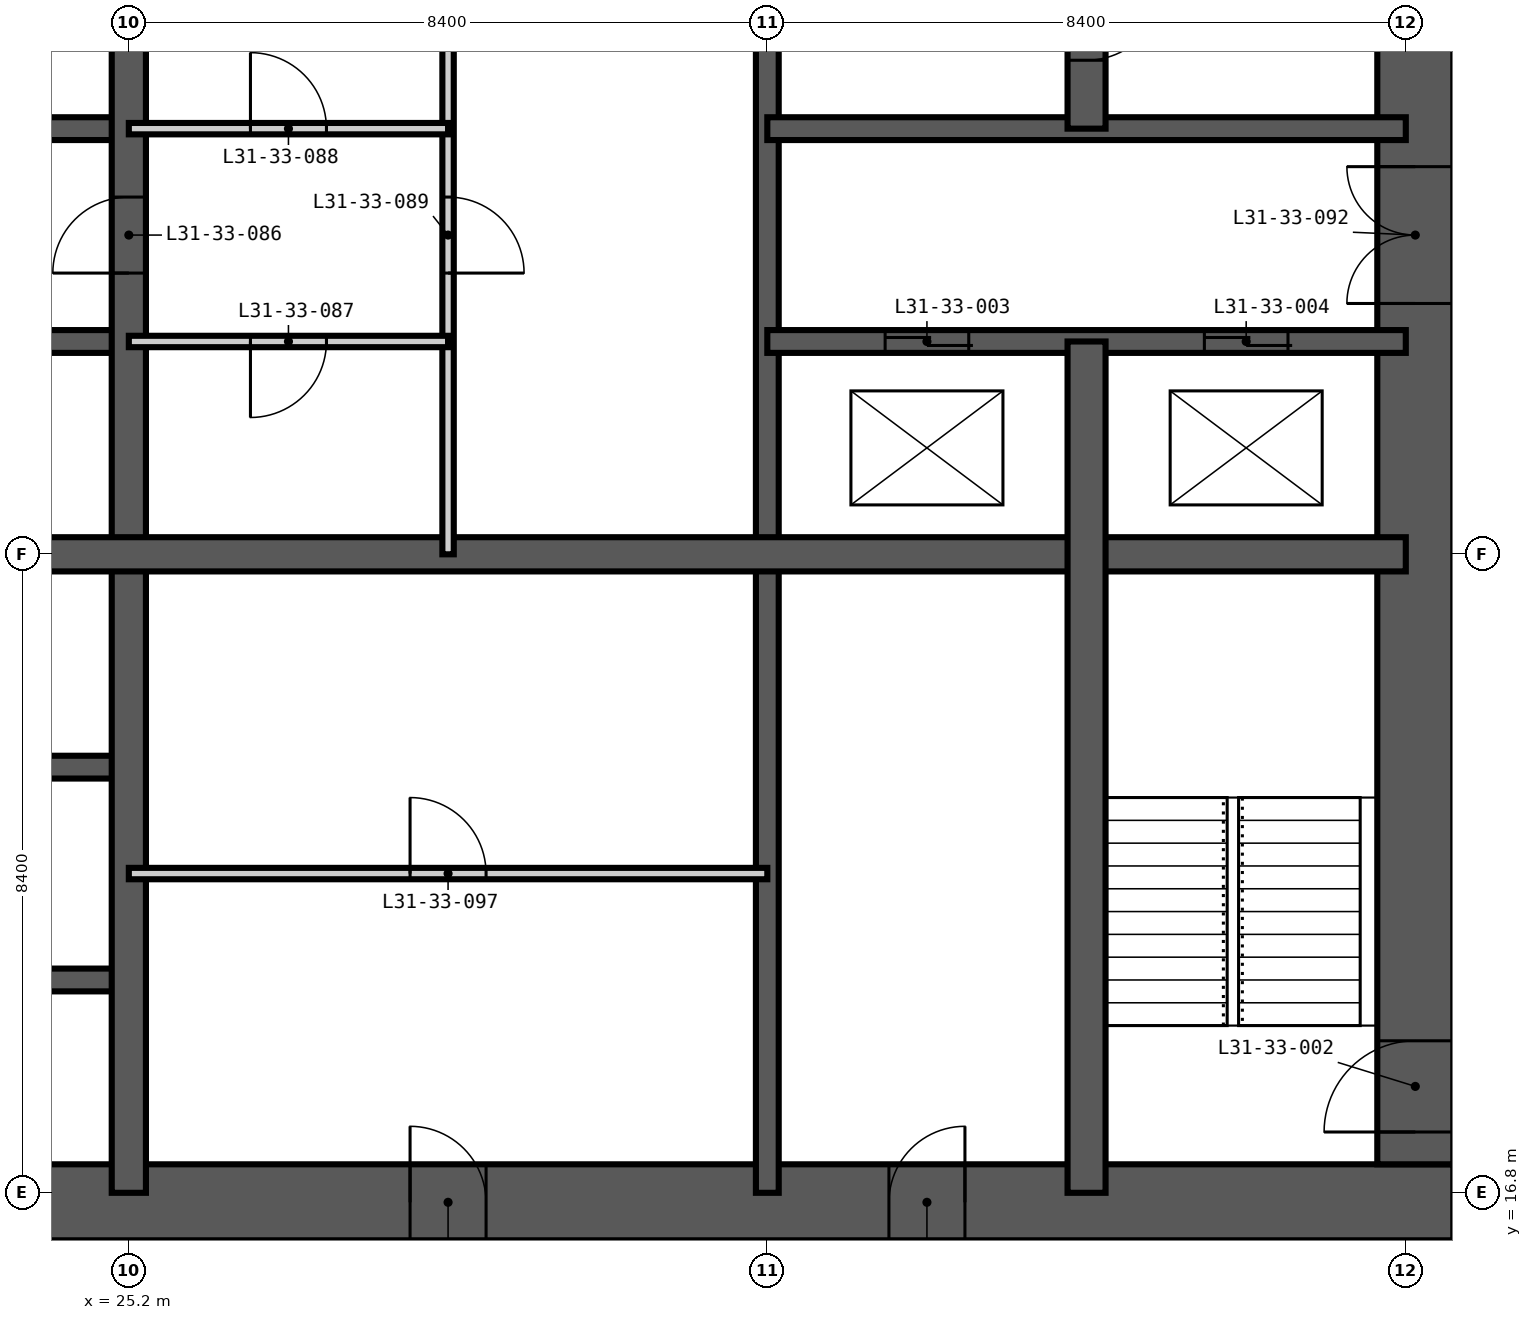
"""IFC4 building model, lengths in metres.
Left out: names, types, materials, properties, quantities, classifications, styles, units other than length and angle.
Written with IfcOpenShell. Run it as: python <this file> out.ifc"""

import sys

from ifc_helpers import new_model, si_unit, direction, frame, frame_2d, origin, place, context, subcontext, project, spatial, rectangle, extrude, element, fill, save


model = new_model("IFC4")
c1 = context("Model", 3, precision=1e-05, world=origin(), true_north=direction((0.0, 1.0)))
c2 = subcontext(c1, "Body", "Model", "MODEL_VIEW")
j1 = project(units=[si_unit("LENGTHUNIT", "METRE"), si_unit("PLANEANGLEUNIT", "RADIAN")], contexts=[c1])
p1 = place(None, origin())
s1 = spatial("IfcSite", under=j1, at=p1, CompositionType="ELEMENT")
p2 = place(p1, origin())
s2 = spatial("IfcBuilding", under=s1, at=p2, CompositionType="ELEMENT")
p3 = place(p2, frame((0.0, 0.0, 122.4)))
s3 = spatial("IfcBuildingStorey", under=s2, at=p3, CompositionType="ELEMENT", Elevation=122.4)
p4 = place(p3, frame((16.175, 16.675, -0.35), z_axis=(0.0, 0.0, 1.0), x_axis=(1.0, 0.0, 0.0)))
e1 = element("IfcWall", 1, at=p4, inside=s3, PredefinedType="SHEAR", context=c2, shape_type="SweptSolid", body=[
    extrude(rectangle(XDim=26.45, YDim=1.0, at=frame_2d((13.225, 0.0))), origin(), (0.0, 0.0, 1.0), 3.6),
])
p5 = place(p4, frame((12.725, 0.0, 0.35)))
e2 = element("IfcOpeningElement", 2, at=p5, cuts=e1, PredefinedType="OPENING", context=c2, shape_type="SweptSolid", body=[
    extrude(rectangle(XDim=1.0, YDim=2.1, at=frame_2d((0.5, 1.05))), frame((0.0, 0.51, 0.0), z_axis=(0.0, -1.0, 0.0), x_axis=(1.0, 0.0, 0.0)), (0.0, 0.0, 1.0), 1.02),
])
p6 = place(p4, frame((19.025, 0.0, 0.35)))
e3 = element("IfcOpeningElement", 3, at=p6, cuts=e1, PredefinedType="OPENING", context=c2, shape_type="SweptSolid", body=[
    extrude(rectangle(XDim=1.0, YDim=2.1, at=frame_2d((0.5, 1.05))), frame((0.0, 0.51, 0.0), z_axis=(0.0, -1.0, 0.0), x_axis=(1.0, 0.0, 0.0)), (0.0, 0.0, 1.0), 1.02),
])
p7 = place(p3, frame((42.125, 17.175, -0.35), z_axis=(0.0, 0.0, 1.0), x_axis=(0.0, 1.0, 0.0)))
e4 = element("IfcWall", 4, at=p7, inside=s3, PredefinedType="SHEAR", context=c2, shape_type="SweptSolid", body=[
    extrude(rectangle(XDim=24.45, YDim=1.0, at=frame_2d((12.225, 0.0))), origin(), (0.0, 0.0, 1.0), 3.6),
])
p8 = place(p7, frame((0.425, 0.0, 0.35)))
e5 = element("IfcOpeningElement", 5, at=p8, cuts=e4, PredefinedType="OPENING", context=c2, shape_type="SweptSolid", body=[
    extrude(rectangle(XDim=1.2, YDim=2.2, at=frame_2d((0.6, 1.1))), frame((0.0, 0.51, 0.0), z_axis=(0.0, -1.0, 0.0), x_axis=(1.0, 0.0, 0.0)), (0.0, 0.0, 1.0), 1.02),
])
p9 = place(p7, frame((11.325, 0.0, 0.35)))
e6 = element("IfcOpeningElement", 6, at=p9, cuts=e4, PredefinedType="OPENING", context=c2, shape_type="SweptSolid", body=[
    extrude(rectangle(XDim=1.8, YDim=2.2, at=frame_2d((0.9, 1.1))), frame((0.0, 0.51, 0.0), z_axis=(0.0, -1.0, 0.0), x_axis=(1.0, 0.0, 0.0)), (0.0, 0.0, 1.0), 1.02),
])
p10 = place(p7, frame((20.125, 0.0, 0.35)))
e7 = element("IfcOpeningElement", 7, at=p10, cuts=e4, PredefinedType="OPENING", context=c2, shape_type="SweptSolid", body=[
    extrude(rectangle(XDim=1.0, YDim=2.1, at=frame_2d((0.5, 1.05))), frame((0.0, 0.51, 0.0), z_axis=(0.0, -1.0, 0.0), x_axis=(1.0, 0.0, 0.0)), (0.0, 0.0, 1.0), 1.02),
])
p11 = place(p3, frame((33.6, 16.8, -0.35), z_axis=(0.0, 0.0, 1.0), x_axis=(0.0, 1.0, 0.0)))
e8 = element("IfcWall", 8, at=p11, inside=s3, PredefinedType="SHEAR", context=c2, shape_type="SweptSolid", body=[
    extrude(rectangle(XDim=25.2, YDim=0.3, at=frame_2d((12.6, 0.0))), origin(), (0.0, 0.0, 1.0), 3.6),
])
p12 = place(p11, frame((22.5, 0.0, 0.35)))
e9 = element("IfcOpeningElement", 9, at=p12, cuts=e8, PredefinedType="OPENING", context=c2, shape_type="SweptSolid", body=[
    extrude(rectangle(XDim=1.2, YDim=2.2, at=frame_2d((0.6, 1.1))), frame((0.0, 0.16, 0.0), z_axis=(0.0, -1.0, 0.0), x_axis=(1.0, 0.0, 0.0)), (0.0, 0.0, 1.0), 0.32),
])
p13 = place(p11, frame((18.3, 0.0, 0.35)))
e10 = element("IfcOpeningElement", 10, at=p13, cuts=e8, PredefinedType="OPENING", context=c2, shape_type="SweptSolid", body=[
    extrude(rectangle(XDim=1.2, YDim=2.2, at=frame_2d((0.6, 1.1))), frame((0.0, 0.16, 0.0), z_axis=(0.0, -1.0, 0.0), x_axis=(1.0, 0.0, 0.0)), (0.0, 0.0, 1.0), 0.32),
])
for number, where, z_axis, x_axis in (
    (11, (16.8, 19.6, -0.35), (0.0, 0.0, 1.0), (1.0, 0.0, 0.0)),
    (12, (16.8, 22.4, -0.35), (0.0, 0.0, 1.0), (1.0, 0.0, 0.0)),
):
    element("IfcWall", number, at=place(p3, frame(where, z_axis=z_axis, x_axis=x_axis)), inside=s3, PredefinedType="SHEAR", context=c2, shape_type="SweptSolid", body=[
        extrude(rectangle(XDim=8.4, YDim=0.3, at=frame_2d((4.2, 0.0))), origin(), (0.0, 0.0, 1.0), 3.6),
    ])
p14 = place(p3, frame((16.8, 28.0, -0.35), z_axis=(0.0, 0.0, 1.0), x_axis=(1.0, 0.0, 0.0)))
e13 = element("IfcWall", 13, at=p14, inside=s3, PredefinedType="SHEAR", context=c2, shape_type="SweptSolid", body=[
    extrude(rectangle(XDim=8.4, YDim=0.3, at=frame_2d((4.2, 0.0))), origin(), (0.0, 0.0, 1.0), 3.6),
])
p15 = place(p14, frame((1.55, 0.0, 0.35)))
e14 = element("IfcOpeningElement", 14, at=p15, cuts=e13, PredefinedType="OPENING", context=c2, shape_type="SweptSolid", body=[
    extrude(rectangle(XDim=1.1, YDim=2.2, at=frame_2d((0.55, 1.1))), frame((0.0, 0.16, 0.0), z_axis=(0.0, -1.0, 0.0), x_axis=(1.0, 0.0, 0.0)), (0.0, 0.0, 1.0), 0.32),
])
p16 = place(p14, frame((5.75, 0.0, 0.35)))
e15 = element("IfcOpeningElement", 15, at=p16, cuts=e13, PredefinedType="OPENING", context=c2, shape_type="SweptSolid", body=[
    extrude(rectangle(XDim=1.1, YDim=2.2, at=frame_2d((0.55, 1.1))), frame((0.0, 0.16, 0.0), z_axis=(0.0, -1.0, 0.0), x_axis=(1.0, 0.0, 0.0)), (0.0, 0.0, 1.0), 0.32),
])
p17 = place(p3, frame((33.6, 28.0, -0.35), z_axis=(0.0, 0.0, 1.0), x_axis=(1.0, 0.0, 0.0)))
e16 = element("IfcWall", 16, at=p17, inside=s3, PredefinedType="SHEAR", context=c2, shape_type="SweptSolid", body=[
    extrude(rectangle(XDim=8.4, YDim=0.3, at=frame_2d((4.2, 0.0))), origin(), (0.0, 0.0, 1.0), 3.6),
])
p18 = place(p17, frame((1.55, 0.0, 0.35)))
e17 = element("IfcOpeningElement", 17, at=p18, cuts=e16, PredefinedType="OPENING", context=c2, shape_type="SweptSolid", body=[
    extrude(rectangle(XDim=1.1, YDim=2.2, at=frame_2d((0.55, 1.1))), frame((0.0, 0.16, 0.0), z_axis=(0.0, -1.0, 0.0), x_axis=(1.0, 0.0, 0.0)), (0.0, 0.0, 1.0), 0.32),
])
p19 = place(p17, frame((5.75, 0.0, 0.35)))
e18 = element("IfcOpeningElement", 18, at=p19, cuts=e16, PredefinedType="OPENING", context=c2, shape_type="SweptSolid", body=[
    extrude(rectangle(XDim=1.1, YDim=2.2, at=frame_2d((0.55, 1.1))), frame((0.0, 0.16, 0.0), z_axis=(0.0, -1.0, 0.0), x_axis=(1.0, 0.0, 0.0)), (0.0, 0.0, 1.0), 0.32),
])
p20 = place(p3, frame((16.8, 30.8, -0.35), z_axis=(0.0, 0.0, 1.0), x_axis=(1.0, 0.0, 0.0)))
e19 = element("IfcWall", 19, at=p20, inside=s3, PredefinedType="SHEAR", context=c2, shape_type="SweptSolid", body=[
    extrude(rectangle(XDim=8.4, YDim=0.3, at=frame_2d((4.2, 0.0))), origin(), (0.0, 0.0, 1.0), 3.6),
])
p21 = place(p20, frame((1.55, 0.0, 0.35)))
e20 = element("IfcOpeningElement", 20, at=p21, cuts=e19, PredefinedType="OPENING", context=c2, shape_type="SweptSolid", body=[
    extrude(rectangle(XDim=1.1, YDim=2.2, at=frame_2d((0.55, 1.1))), frame((0.0, 0.16, 0.0), z_axis=(0.0, -1.0, 0.0), x_axis=(1.0, 0.0, 0.0)), (0.0, 0.0, 1.0), 0.32),
])
p22 = place(p20, frame((5.75, 0.0, 0.35)))
e21 = element("IfcOpeningElement", 21, at=p22, cuts=e19, PredefinedType="OPENING", context=c2, shape_type="SweptSolid", body=[
    extrude(rectangle(XDim=1.1, YDim=2.2, at=frame_2d((0.55, 1.1))), frame((0.0, 0.16, 0.0), z_axis=(0.0, -1.0, 0.0), x_axis=(1.0, 0.0, 0.0)), (0.0, 0.0, 1.0), 0.32),
])
p23 = place(p3, frame((33.6, 30.8, -0.35), z_axis=(0.0, 0.0, 1.0), x_axis=(1.0, 0.0, 0.0)))
e22 = element("IfcWall", 22, at=p23, inside=s3, PredefinedType="SHEAR", context=c2, shape_type="SweptSolid", body=[
    extrude(rectangle(XDim=8.4, YDim=0.3, at=frame_2d((4.2, 0.0))), origin(), (0.0, 0.0, 1.0), 3.6),
])
p24 = place(p3, frame((25.2, 16.8, -0.35), z_axis=(0.0, 0.0, 1.0), x_axis=(0.0, 1.0, 0.0)))
e23 = element("IfcWall", 23, at=p24, inside=s3, PredefinedType="SHEAR", context=c2, shape_type="SweptSolid", body=[
    extrude(rectangle(XDim=25.2, YDim=0.45, at=frame_2d((12.6, 0.0))), origin(), (0.0, 0.0, 1.0), 3.6),
])
p25 = place(p24, frame((12.1, 0.0, 0.35)))
e24 = element("IfcOpeningElement", 24, at=p25, cuts=e23, PredefinedType="OPENING", context=c2, shape_type="SweptSolid", body=[
    extrude(rectangle(XDim=1.0, YDim=2.1, at=frame_2d((0.5, 1.05))), frame((0.0, 0.235, 0.0), z_axis=(0.0, -1.0, 0.0), x_axis=(1.0, 0.0, 0.0)), (0.0, 0.0, 1.0), 0.47),
])
p26 = place(p3, frame((16.8, 25.2, -0.35), z_axis=(0.0, 0.0, 1.0), x_axis=(1.0, 0.0, 0.0)))
e25 = element("IfcWall", 25, at=p26, inside=s3, PredefinedType="SHEAR", context=c2, shape_type="SweptSolid", body=[
    extrude(rectangle(XDim=25.2, YDim=0.45, at=frame_2d((12.6, 0.0))), origin(), (0.0, 0.0, 1.0), 3.6),
])
p27 = place(p3, frame((37.8, 16.8, -0.35), z_axis=(0.0, 0.0, 1.0), x_axis=(0.0, 1.0, 0.0)))
e26 = element("IfcWall", 26, at=p27, inside=s3, PredefinedType="SHEAR", context=c2, shape_type="SweptSolid", body=[
    extrude(rectangle(XDim=11.2, YDim=0.5, at=frame_2d((5.6, 0.0))), origin(), (0.0, 0.0, 1.0), 3.6),
])
p28 = place(p3, frame((37.8, 30.8, -0.35), z_axis=(0.0, 0.0, 1.0), x_axis=(0.0, 1.0, 0.0)))
e27 = element("IfcWall", 27, at=p28, inside=s3, PredefinedType="SHEAR", context=c2, shape_type="SweptSolid", body=[
    extrude(rectangle(XDim=2.8, YDim=0.5, at=frame_2d((1.4, 0.0))), origin(), (0.0, 0.0, 1.0), 3.6),
])
p29 = place(p28, frame((0.9, 0.0, 0.35)))
e28 = element("IfcOpeningElement", 28, at=p29, cuts=e27, PredefinedType="OPENING", context=c2, shape_type="SweptSolid", body=[
    extrude(rectangle(XDim=1.0, YDim=2.1, at=frame_2d((0.5, 1.05))), frame((0.0, 0.26, 0.0), z_axis=(0.0, -1.0, 0.0), x_axis=(1.0, 0.0, 0.0)), (0.0, 0.0, 1.0), 0.52),
])
p30 = place(p3, frame((29.4, 25.2, 0.0), z_axis=(0.0, 0.0, 1.0), x_axis=(0.0, 1.0, 0.0)))
e29 = element("IfcWall", 29, at=p30, inside=s3, PredefinedType="PARTITIONING", context=c2, shape_type="SweptSolid", body=[
    extrude(rectangle(XDim=8.4, YDim=0.15, at=frame_2d((4.2, 0.0))), origin(), (0.0, 0.0, 1.0), 3.25),
])
p31 = place(p30, frame((3.7, 0.0, 0.0)))
e30 = element("IfcOpeningElement", 30, at=p31, cuts=e29, PredefinedType="OPENING", context=c2, shape_type="SweptSolid", body=[
    extrude(rectangle(XDim=1.0, YDim=2.1, at=frame_2d((0.5, 1.05))), frame((0.0, 0.085, 0.0), z_axis=(0.0, -1.0, 0.0), x_axis=(1.0, 0.0, 0.0)), (0.0, 0.0, 1.0), 0.17),
])
p32 = place(p3, frame((25.2, 21.0, 0.0), z_axis=(0.0, 0.0, 1.0), x_axis=(1.0, 0.0, 0.0)))
e31 = element("IfcWall", 31, at=p32, inside=s3, PredefinedType="PARTITIONING", context=c2, shape_type="SweptSolid", body=[
    extrude(rectangle(XDim=8.4, YDim=0.15, at=frame_2d((4.2, 0.0))), origin(), (0.0, 0.0, 1.0), 3.25),
])
p33 = place(p32, frame((3.7, 0.0, 0.0)))
e32 = element("IfcOpeningElement", 32, at=p33, cuts=e31, PredefinedType="OPENING", context=c2, shape_type="SweptSolid", body=[
    extrude(rectangle(XDim=1.0, YDim=2.1, at=frame_2d((0.5, 1.05))), frame((0.0, 0.085, 0.0), z_axis=(0.0, -1.0, 0.0), x_axis=(1.0, 0.0, 0.0)), (0.0, 0.0, 1.0), 0.17),
])
p34 = place(p3, frame((25.2, 28.0, 0.0), z_axis=(0.0, 0.0, 1.0), x_axis=(1.0, 0.0, 0.0)))
e33 = element("IfcWall", 33, at=p34, inside=s3, PredefinedType="PARTITIONING", context=c2, shape_type="SweptSolid", body=[
    extrude(rectangle(XDim=4.2, YDim=0.15, at=frame_2d((2.1, 0.0))), origin(), (0.0, 0.0, 1.0), 3.25),
])
p35 = place(p34, frame((1.6, 0.0, 0.0)))
e34 = element("IfcOpeningElement", 34, at=p35, cuts=e33, PredefinedType="OPENING", context=c2, shape_type="SweptSolid", body=[
    extrude(rectangle(XDim=1.0, YDim=2.1, at=frame_2d((0.5, 1.05))), frame((0.0, 0.085, 0.0), z_axis=(0.0, -1.0, 0.0), x_axis=(1.0, 0.0, 0.0)), (0.0, 0.0, 1.0), 0.17),
])
p36 = place(p3, frame((25.2, 30.8, 0.0), z_axis=(0.0, 0.0, 1.0), x_axis=(1.0, 0.0, 0.0)))
e35 = element("IfcWall", 35, at=p36, inside=s3, PredefinedType="PARTITIONING", context=c2, shape_type="SweptSolid", body=[
    extrude(rectangle(XDim=4.2, YDim=0.15, at=frame_2d((2.1, 0.0))), origin(), (0.0, 0.0, 1.0), 3.25),
])
p37 = place(p36, frame((1.6, 0.0, 0.0)))
e36 = element("IfcOpeningElement", 36, at=p37, cuts=e35, PredefinedType="OPENING", context=c2, shape_type="SweptSolid", body=[
    extrude(rectangle(XDim=1.0, YDim=2.1, at=frame_2d((0.5, 1.05))), frame((0.0, 0.085, 0.0), z_axis=(0.0, -1.0, 0.0), x_axis=(1.0, 0.0, 0.0)), (0.0, 0.0, 1.0), 0.17),
])
p38 = place(p8, origin())
e37 = element("IfcDoor", 37, at=p38, inside=s3, OperationType="SINGLE_SWING_LEFT", PredefinedType="DOOR", context=c2, shape_type="SweptSolid", body=[
    extrude(rectangle(XDim=1.2, YDim=2.2, at=frame_2d((0.6, 1.1))), frame((0.0, 0.025, 0.0), z_axis=(0.0, -1.0, 0.0), x_axis=(1.0, 0.0, 0.0)), (0.0, 0.0, 1.0), 0.05),
])
fill(e5, e37)
p39 = place(p18, origin())
e38 = element("IfcDoor", 38, at=p39, inside=s3, OperationType="DOUBLE_DOOR_SLIDING", PredefinedType="DOOR", context=c2, shape_type="SweptSolid", body=[
    extrude(rectangle(XDim=1.1, YDim=2.2, at=frame_2d((0.55, 1.1))), frame((0.0, 0.025, 0.0), z_axis=(0.0, -1.0, 0.0), x_axis=(1.0, 0.0, 0.0)), (0.0, 0.0, 1.0), 0.05),
])
fill(e17, e38)
p40 = place(p19, origin())
e39 = element("IfcDoor", 39, at=p40, inside=s3, OperationType="DOUBLE_DOOR_SLIDING", PredefinedType="DOOR", context=c2, shape_type="SweptSolid", body=[
    extrude(rectangle(XDim=1.1, YDim=2.2, at=frame_2d((0.55, 1.1))), frame((0.0, 0.025, 0.0), z_axis=(0.0, -1.0, 0.0), x_axis=(1.0, 0.0, 0.0)), (0.0, 0.0, 1.0), 0.05),
])
fill(e18, e39)
p41 = place(p25, origin())
e40 = element("IfcDoor", 40, at=p41, inside=s3, OperationType="SINGLE_SWING_LEFT", PredefinedType="DOOR", context=c2, shape_type="SweptSolid", body=[
    extrude(rectangle(XDim=1.0, YDim=2.1, at=frame_2d((0.5, 1.05))), frame((0.0, 0.025, 0.0), z_axis=(0.0, -1.0, 0.0), x_axis=(1.0, 0.0, 0.0)), (0.0, 0.0, 1.0), 0.05),
])
fill(e24, e40)
p42 = place(p35, frame((1.0, 0.0, 0.0), z_axis=(0.0, 0.0, 1.0), x_axis=(-1.0, 0.0, 0.0)))
e41 = element("IfcDoor", 41, at=p42, inside=s3, OperationType="SINGLE_SWING_RIGHT", PredefinedType="DOOR", context=c2, shape_type="SweptSolid", body=[
    extrude(rectangle(XDim=1.0, YDim=2.1, at=frame_2d((0.5, 1.05))), frame((0.0, 0.025, 0.0), z_axis=(0.0, -1.0, 0.0), x_axis=(1.0, 0.0, 0.0)), (0.0, 0.0, 1.0), 0.05),
])
fill(e34, e41)
p43 = place(p37, origin())
e42 = element("IfcDoor", 42, at=p43, inside=s3, OperationType="SINGLE_SWING_LEFT", PredefinedType="DOOR", context=c2, shape_type="SweptSolid", body=[
    extrude(rectangle(XDim=1.0, YDim=2.1, at=frame_2d((0.5, 1.05))), frame((0.0, 0.025, 0.0), z_axis=(0.0, -1.0, 0.0), x_axis=(1.0, 0.0, 0.0)), (0.0, 0.0, 1.0), 0.05),
])
fill(e36, e42)
p44 = place(p31, frame((1.0, 0.0, 0.0), z_axis=(0.0, 0.0, 1.0), x_axis=(-1.0, 0.0, 0.0)))
e43 = element("IfcDoor", 43, at=p44, inside=s3, OperationType="SINGLE_SWING_RIGHT", PredefinedType="DOOR", context=c2, shape_type="SweptSolid", body=[
    extrude(rectangle(XDim=1.0, YDim=2.1, at=frame_2d((0.5, 1.05))), frame((0.0, 0.025, 0.0), z_axis=(0.0, -1.0, 0.0), x_axis=(1.0, 0.0, 0.0)), (0.0, 0.0, 1.0), 0.05),
])
fill(e30, e43)
p45 = place(p29, frame((1.0, 0.0, 0.0), z_axis=(0.0, 0.0, 1.0), x_axis=(-1.0, 0.0, 0.0)))
e44 = element("IfcDoor", 44, at=p45, inside=s3, OperationType="SINGLE_SWING_LEFT", PredefinedType="DOOR", context=c2, shape_type="SweptSolid", body=[
    extrude(rectangle(XDim=1.0, YDim=2.1, at=frame_2d((0.5, 1.05))), frame((0.0, 0.025, 0.0), z_axis=(0.0, -1.0, 0.0), x_axis=(1.0, 0.0, 0.0)), (0.0, 0.0, 1.0), 0.05),
])
fill(e28, e44)
p46 = place(p9, origin())
e45 = element("IfcDoor", 45, at=p46, inside=s3, OperationType="DOUBLE_DOOR_DOUBLE_SWING", PredefinedType="DOOR", context=c2, shape_type="SweptSolid", body=[
    extrude(rectangle(XDim=1.8, YDim=2.2, at=frame_2d((0.9, 1.1))), frame((0.0, 0.025, 0.0), z_axis=(0.0, -1.0, 0.0), x_axis=(1.0, 0.0, 0.0)), (0.0, 0.0, 1.0), 0.05),
])
fill(e6, e45)
p47 = place(p5, origin())
e46 = element("IfcDoor", 46, at=p47, inside=s3, OperationType="SINGLE_SWING_LEFT", PredefinedType="DOOR", context=c2, shape_type="SweptSolid", body=[
    extrude(rectangle(XDim=1.0, YDim=2.1, at=frame_2d((0.5, 1.05))), frame((0.0, 0.025, 0.0), z_axis=(0.0, -1.0, 0.0), x_axis=(1.0, 0.0, 0.0)), (0.0, 0.0, 1.0), 0.05),
])
fill(e2, e46)
p48 = place(p33, origin())
e47 = element("IfcDoor", 47, at=p48, inside=s3, OperationType="SINGLE_SWING_LEFT", PredefinedType="DOOR", context=c2, shape_type="SweptSolid", body=[
    extrude(rectangle(XDim=1.0, YDim=2.1, at=frame_2d((0.5, 1.05))), frame((0.0, 0.025, 0.0), z_axis=(0.0, -1.0, 0.0), x_axis=(1.0, 0.0, 0.0)), (0.0, 0.0, 1.0), 0.05),
])
fill(e32, e47)
p49 = place(p6, origin())
e48 = element("IfcDoor", 48, at=p49, inside=s3, OperationType="SINGLE_SWING_RIGHT", PredefinedType="DOOR", context=c2, shape_type="SweptSolid", body=[
    extrude(rectangle(XDim=1.0, YDim=2.1, at=frame_2d((0.5, 1.05))), frame((0.0, 0.025, 0.0), z_axis=(0.0, -1.0, 0.0), x_axis=(1.0, 0.0, 0.0)), (0.0, 0.0, 1.0), 0.05),
])
fill(e3, e48)
save(model, sys.argv[1])
